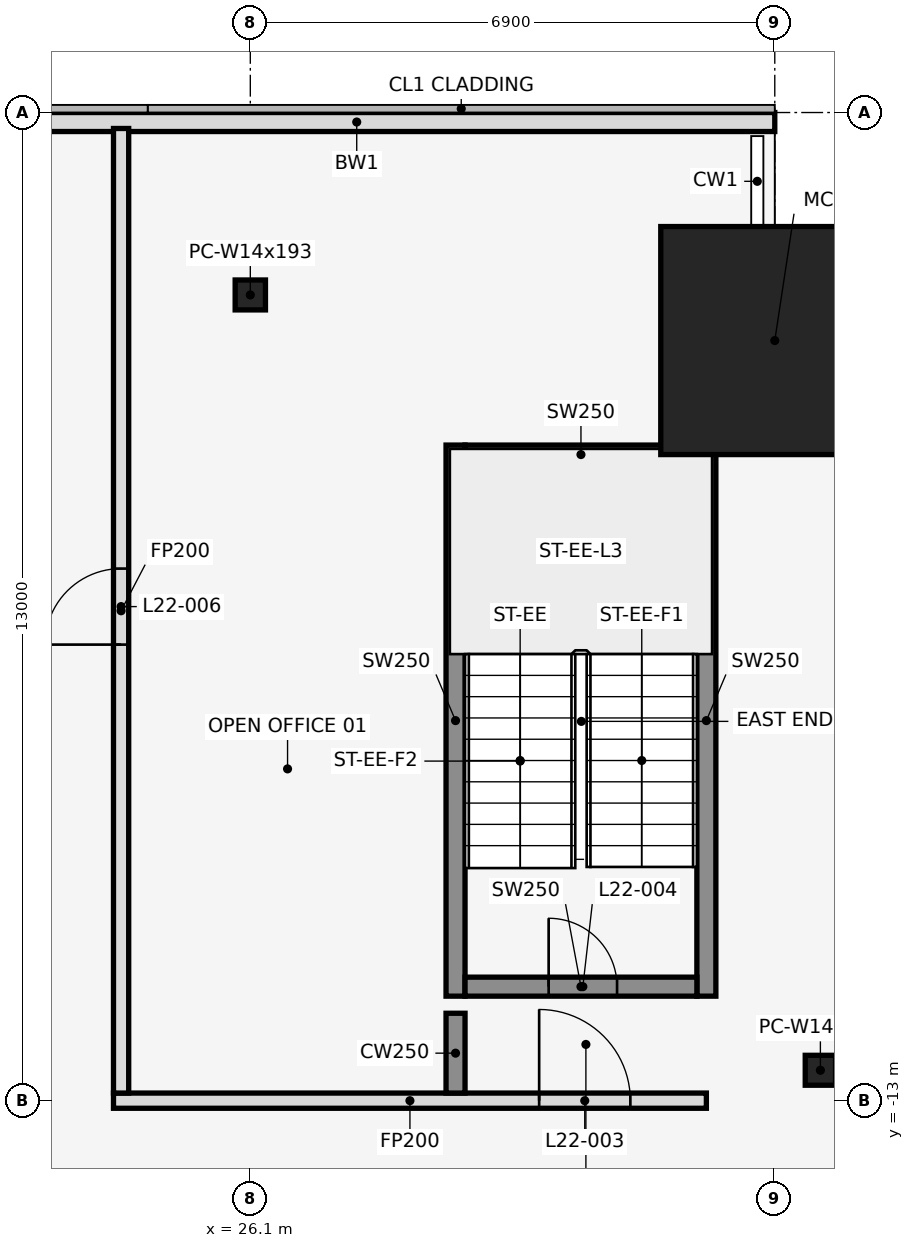
"""IFC4 building model, lengths in metres.
Left out: names, types, materials, properties, quantities, classifications, styles, units other than length and angle.
Written with IfcOpenShell. Run it as: python <this file> out.ifc"""

import sys

from ifc_helpers import new_model, si_unit, direction, frame, frame_2d, origin, origin_2d, place, context, subcontext, project, spatial, rectangle, hollow_rectangle, i_section, extrude, element, fill, save


model = new_model("IFC4")
c1 = context("Model", 3, precision=1e-05, world=origin(), true_north=direction((0.0, 1.0)))
c2 = subcontext(c1, "Body", "Model", "MODEL_VIEW")
j1 = project(units=[si_unit("LENGTHUNIT", "METRE"), si_unit("PLANEANGLEUNIT", "RADIAN")], contexts=[c1])
p1 = place(None, origin())
s1 = spatial("IfcSite", under=j1, at=p1, CompositionType="ELEMENT")
p2 = place(p1, origin())
s2 = spatial("IfcBuilding", under=s1, at=p2, CompositionType="ELEMENT")
p3 = place(p2, frame((0.0, 0.0, 106.3)))
s3 = spatial("IfcBuildingStorey", under=s2, at=p3, CompositionType="ELEMENT", Elevation=106.3)
p4 = place(p3, frame((26.1, -2.4, 0.0), z_axis=(0.0, 0.0, 1.0), x_axis=(1.0, 0.0, 0.0)))
e1 = element("IfcColumn", 1, at=p4, inside=s3, PredefinedType="COLUMN", context=c2, shape_type="SweptSolid", body=[
    extrude(i_section(OverallWidth=0.399, OverallDepth=0.394, WebThickness=0.023, FlangeThickness=0.037, at=origin_2d()), origin(), (0.0, 0.0, 1.0), 4.1),
])
p5 = place(p3, frame((33.0, -3.0, 0.0), z_axis=(0.0, 0.0, 1.0), x_axis=(1.0, 0.0, 0.0)))
e2 = element("IfcColumn", 2, at=p5, inside=s3, PredefinedType="COLUMN", context=c2, shape_type="SweptSolid", body=[
    extrude(hollow_rectangle(XDim=3.0, YDim=3.0, WallThickness=0.09, at=origin_2d()), origin(), (0.0, 0.0, 1.0), 4.1),
])
p6 = place(p3, frame((33.6, -12.6, 0.0), z_axis=(0.0, 0.0, 1.0), x_axis=(1.0, 0.0, 0.0)))
e3 = element("IfcColumn", 3, at=p6, inside=s3, PredefinedType="COLUMN", context=c2, shape_type="SweptSolid", body=[
    extrude(i_section(OverallWidth=0.399, OverallDepth=0.394, WebThickness=0.023, FlangeThickness=0.037, at=origin_2d()), origin(), (0.0, 0.0, 1.0), 4.1),
])
p7 = place(p3, frame((33.0, -0.125, 0.0), z_axis=(0.0, 0.0, 1.0), x_axis=(-1.0, 0.0, 0.0)))
e4 = element("IfcWall", 4, at=p7, inside=s3, PredefinedType="STANDARD", context=c2, shape_type="SweptSolid", body=[
    extrude(rectangle(XDim=11.0, YDim=0.25, at=frame_2d((5.5, 0.0))), origin(), (0.0, 0.0, 1.0), 3.95),
])
for number, where, z_axis, x_axis in (
    (5, (28.8, -11.625, 0.0), (0.0, 0.0, 1.0), (0.0, 1.0, 0.0)),
    (6, (32.1, -11.625, 0.0), (0.0, 0.0, 1.0), (0.0, 1.0, 0.0)),
):
    element("IfcWall", number, at=place(p3, frame(where, z_axis=z_axis, x_axis=x_axis)), inside=s3, PredefinedType="SHEAR", context=c2, shape_type="SweptSolid", body=[
        extrude(rectangle(XDim=7.25, YDim=0.25, at=frame_2d((3.625, 0.0))), origin(), (0.0, 0.0, 1.0), 4.1),
    ])
p8 = place(p3, frame((28.925, -11.5, 0.0), z_axis=(0.0, 0.0, 1.0), x_axis=(1.0, 0.0, 0.0)))
e7 = element("IfcWall", 7, at=p8, inside=s3, PredefinedType="SHEAR", context=c2, shape_type="SweptSolid", body=[
    extrude(rectangle(XDim=3.05, YDim=0.25, at=frame_2d((1.525, 0.0))), origin(), (0.0, 0.0, 1.0), 4.1),
])
p9 = place(p8, frame((1.1, 0.0, 0.0)))
e8 = element("IfcOpeningElement", 8, at=p9, cuts=e7, PredefinedType="OPENING", context=c2, shape_type="SweptSolid", body=[
    extrude(rectangle(XDim=0.9, YDim=2.1, at=frame_2d((0.45, 1.05))), frame((0.0, 0.137, 0.0), z_axis=(0.0, -1.0, 0.0), x_axis=(1.0, 0.0, 0.0)), (0.0, 0.0, 1.0), 0.274),
])
p10 = place(p3, frame((28.925, -4.5, 0.0), z_axis=(0.0, 0.0, 1.0), x_axis=(1.0, 0.0, 0.0)))
e9 = element("IfcWall", 9, at=p10, inside=s3, PredefinedType="SHEAR", context=c2, shape_type="SweptSolid", body=[
    extrude(rectangle(XDim=3.05, YDim=0.25, at=frame_2d((1.525, 0.0))), origin(), (0.0, 0.0, 1.0), 4.1),
])
p11 = place(p3, frame((24.3, -13.0, 0.0), z_axis=(0.0, 0.0, 1.0), x_axis=(1.0, 0.0, 0.0)))
e10 = element("IfcWall", 10, at=p11, inside=s3, PredefinedType="PARTITIONING", context=c2, shape_type="SweptSolid", body=[
    extrude(rectangle(XDim=7.8, YDim=0.2, at=frame_2d((3.9, 0.0))), origin(), (0.0, 0.0, 1.0), 3.018),
])
p12 = place(p11, frame((5.6, 0.0, 0.0)))
e11 = element("IfcOpeningElement", 11, at=p12, cuts=e10, PredefinedType="OPENING", context=c2, shape_type="SweptSolid", body=[
    extrude(rectangle(XDim=1.2, YDim=2.1, at=frame_2d((0.6, 1.05))), frame((0.0, 0.112, 0.0), z_axis=(0.0, -1.0, 0.0), x_axis=(1.0, 0.0, 0.0)), (0.0, 0.0, 1.0), 0.224),
])
p13 = place(p3, frame((24.4, -12.9, 0.0), z_axis=(0.0, 0.0, 1.0), x_axis=(0.0, 1.0, 0.0)))
e12 = element("IfcWall", 12, at=p13, inside=s3, PredefinedType="PARTITIONING", context=c2, shape_type="SweptSolid", body=[
    extrude(rectangle(XDim=12.69, YDim=0.2, at=frame_2d((6.345, 0.0))), origin(), (0.0, 0.0, 1.0), 3.018),
])
p14 = place(p13, frame((5.9, 0.0, 0.0)))
e13 = element("IfcOpeningElement", 13, at=p14, cuts=e12, PredefinedType="OPENING", context=c2, shape_type="SweptSolid", body=[
    extrude(rectangle(XDim=1.0, YDim=2.1, at=frame_2d((0.5, 1.05))), frame((0.0, 0.112, 0.0), z_axis=(0.0, -1.0, 0.0), x_axis=(1.0, 0.0, 0.0)), (0.0, 0.0, 1.0), 0.224),
])
p15 = place(p3, frame((28.8, -12.9, 0.0), z_axis=(0.0, 0.0, 1.0), x_axis=(0.0, 1.0, 0.0)))
e14 = element("IfcWall", 14, at=p15, inside=s3, PredefinedType="SHEAR", context=c2, shape_type="SweptSolid", body=[
    extrude(rectangle(XDim=1.05, YDim=0.25, at=frame_2d((0.525, 0.0))), origin(), (0.0, 0.0, 1.0), 4.1),
])
p16 = place(p12, origin())
e15 = element("IfcDoor", 15, at=p16, inside=s3, OperationType="SINGLE_SWING_RIGHT", PredefinedType="DOOR", context=c2, shape_type="SweptSolid", body=[
    extrude(rectangle(XDim=1.2, YDim=2.1, at=frame_2d((0.6, 1.05))), frame((0.0, 0.025, 0.0), z_axis=(0.0, -1.0, 0.0), x_axis=(1.0, 0.0, 0.0)), (0.0, 0.0, 1.0), 0.05),
])
fill(e11, e15)
p17 = place(p9, origin())
e16 = element("IfcDoor", 16, at=p17, inside=s3, OperationType="SINGLE_SWING_LEFT", PredefinedType="DOOR", context=c2, shape_type="SweptSolid", body=[
    extrude(rectangle(XDim=0.9, YDim=2.1, at=frame_2d((0.45, 1.05))), frame((0.0, 0.025, 0.0), z_axis=(0.0, -1.0, 0.0), x_axis=(1.0, 0.0, 0.0)), (0.0, 0.0, 1.0), 0.05),
])
fill(e8, e16)
p18 = place(p14, frame((1.0, 0.0, 0.0), z_axis=(0.0, 0.0, 1.0), x_axis=(-1.0, 0.0, 0.0)))
e17 = element("IfcDoor", 17, at=p18, inside=s3, OperationType="SINGLE_SWING_RIGHT", PredefinedType="DOOR", context=c2, shape_type="SweptSolid", body=[
    extrude(rectangle(XDim=1.0, YDim=2.1, at=frame_2d((0.5, 1.05))), frame((0.0, 0.025, 0.0), z_axis=(0.0, -1.0, 0.0), x_axis=(1.0, 0.0, 0.0)), (0.0, 0.0, 1.0), 0.05),
])
fill(e13, e17)
save(model, sys.argv[1])
